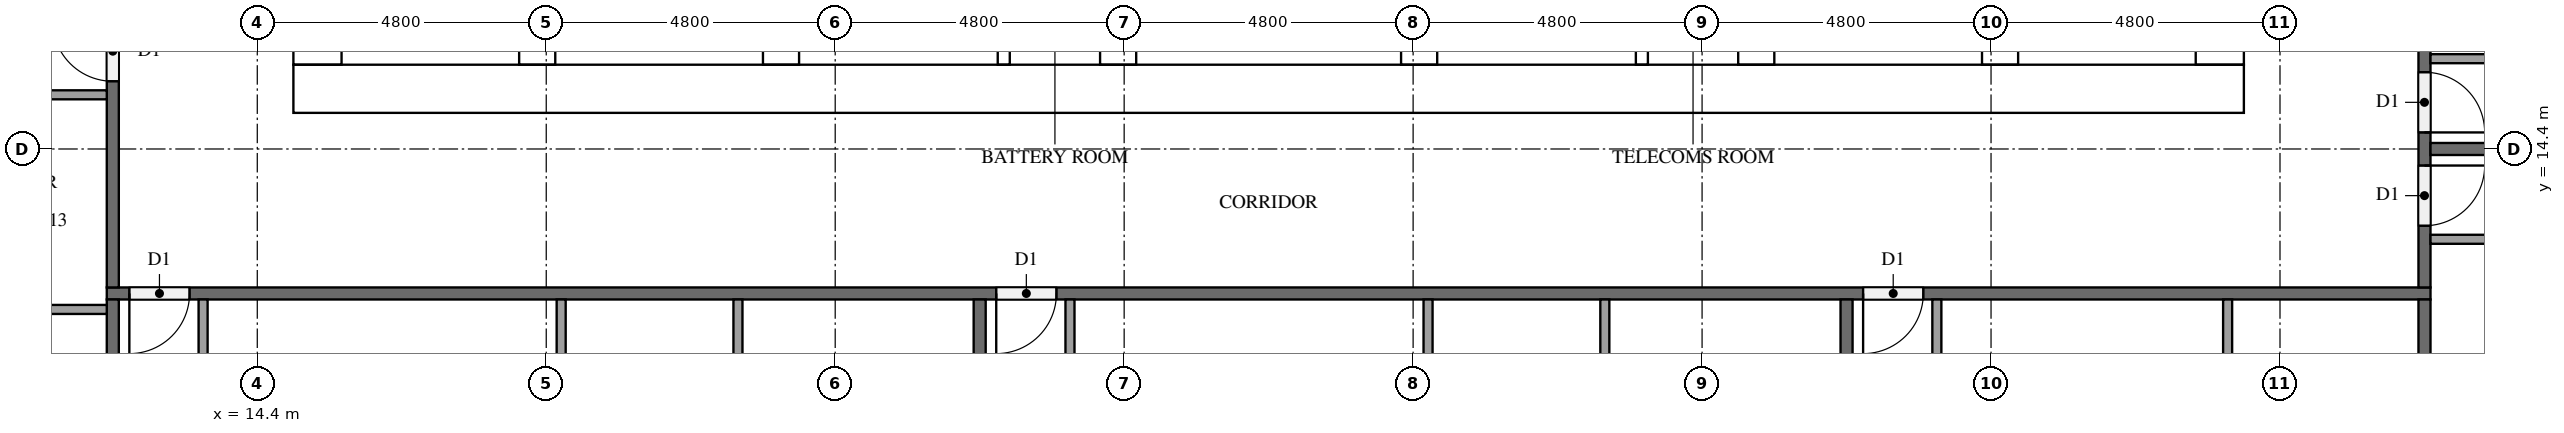
"""IFC4 building model, lengths in metres.
Left out: names, types, materials, properties, quantities, classifications, styles, units other than length and angle.
Written with IfcOpenShell. Run it as: python <this file> out.ifc"""

import sys

from ifc_helpers import new_model, si_unit, direction, frame, frame_2d, origin, place, context, subcontext, project, spatial, rectangle, extrude, element, fill, save


model = new_model("IFC4")
c1 = context("Model", 3, precision=1e-05, world=origin(), true_north=direction((0.0, 1.0)))
c2 = subcontext(c1, "Body", "Model", "MODEL_VIEW")
j1 = project(units=[si_unit("LENGTHUNIT", "METRE"), si_unit("PLANEANGLEUNIT", "RADIAN")], contexts=[c1])
p1 = place(None, origin())
s1 = spatial("IfcSite", under=j1, at=p1, CompositionType="ELEMENT")
p2 = place(p1, origin())
s2 = spatial("IfcBuilding", under=s1, at=p2, CompositionType="ELEMENT")
p3 = place(p2, frame((0.0, 0.0, 170.0)))
s3 = spatial("IfcBuildingStorey", under=s2, at=p3, CompositionType="ELEMENT", Elevation=170.0)
p4 = place(p3, frame((15.0, 15.4, 0.0), z_axis=(0.0, 0.0, 1.0), x_axis=(1.0, 0.0, 0.0)))
e1 = element("IfcWall", 1, at=p4, inside=s3, PredefinedType="SHEAR", context=c2, shape_type="SweptSolid", body=[
    extrude(rectangle(XDim=32.4, YDim=0.8, at=frame_2d((16.2, 0.0))), origin(), (0.0, 0.0, 1.0), 3.1),
])
p5 = place(p4, frame((15.3, 0.0, 0.0)))
e2 = element("IfcOpeningElement", 2, at=p5, cuts=e1, PredefinedType="OPENING", context=c2, shape_type="SweptSolid", body=[
    extrude(rectangle(XDim=1.8, YDim=2.1, at=frame_2d((0.9, 1.05))), frame((0.0, 0.41, 0.0), z_axis=(0.0, -1.0, 0.0), x_axis=(1.0, 0.0, 0.0)), (0.0, 0.0, 1.0), 0.82),
])
p6 = place(p3, frame((15.4, 15.8, 0.0), z_axis=(0.0, 0.0, 1.0), x_axis=(0.0, 1.0, 0.0)))
e3 = element("IfcWall", 3, at=p6, inside=s3, PredefinedType="SHEAR", context=c2, shape_type="SweptSolid", body=[
    extrude(rectangle(XDim=21.2, YDim=0.8, at=frame_2d((10.6, 0.0))), origin(), (0.0, 0.0, 1.0), 3.1),
])
p7 = place(p6, frame((4.96, 0.0, 0.0)))
e4 = element("IfcOpeningElement", 4, at=p7, cuts=e3, PredefinedType="OPENING", context=c2, shape_type="SweptSolid", body=[
    extrude(rectangle(XDim=1.2, YDim=2.1, at=frame_2d((0.6, 1.05))), frame((0.0, 0.41, 0.0), z_axis=(0.0, -1.0, 0.0), x_axis=(1.0, 0.0, 0.0)), (0.0, 0.0, 1.0), 0.82),
])
p8 = place(p3, frame((47.0, 15.8, 0.0), z_axis=(0.0, 0.0, 1.0), x_axis=(0.0, 1.0, 0.0)))
e5 = element("IfcWall", 5, at=p8, inside=s3, PredefinedType="SHEAR", context=c2, shape_type="SweptSolid", body=[
    extrude(rectangle(XDim=21.2, YDim=0.8, at=frame_2d((10.6, 0.0))), origin(), (0.0, 0.0, 1.0), 3.1),
])
p9 = place(p8, frame((10.3, 0.0, 0.0)))
e6 = element("IfcOpeningElement", 6, at=p9, cuts=e5, PredefinedType="OPENING", context=c2, shape_type="SweptSolid", body=[
    extrude(rectangle(XDim=1.2, YDim=2.1, at=frame_2d((0.6, 1.05))), frame((0.0, 0.41, 0.0), z_axis=(0.0, -1.0, 0.0), x_axis=(1.0, 0.0, 0.0)), (0.0, 0.0, 1.0), 0.82),
])
p10 = place(p3, frame((19.05, 15.8, 0.0), z_axis=(0.0, 0.0, 1.0), x_axis=(0.0, 1.0, 0.0)))
e7 = element("IfcWall", 7, at=p10, inside=s3, PredefinedType="SHEAR", context=c2, shape_type="SweptSolid", body=[
    extrude(rectangle(XDim=15.15, YDim=0.6, at=frame_2d((7.575, 0.0))), origin(), (0.0, 0.0, 1.0), 3.1),
])
p11 = place(p10, frame((9.65, 0.0, 0.0)))
e8 = element("IfcOpeningElement", 8, at=p11, cuts=e7, PredefinedType="OPENING", context=c2, shape_type="SweptSolid", body=[
    extrude(rectangle(XDim=1.1, YDim=2.1, at=frame_2d((0.55, 1.05))), frame((0.0, 0.31, 0.0), z_axis=(0.0, -1.0, 0.0), x_axis=(1.0, 0.0, 0.0)), (0.0, 0.0, 1.0), 0.62),
])
p12 = place(p10, frame((13.15, 0.0, 0.0)))
e9 = element("IfcOpeningElement", 9, at=p12, cuts=e7, PredefinedType="OPENING", context=c2, shape_type="SweptSolid", body=[
    extrude(rectangle(XDim=1.1, YDim=2.1, at=frame_2d((0.55, 1.05))), frame((0.0, 0.31, 0.0), z_axis=(0.0, -1.0, 0.0), x_axis=(1.0, 0.0, 0.0)), (0.0, 0.0, 1.0), 0.62),
])
p13 = place(p10, frame((0.4, 0.0, 0.0)))
e10 = element("IfcOpeningElement", 10, at=p13, cuts=e7, PredefinedType="OPENING", context=c2, shape_type="SweptSolid", body=[
    extrude(rectangle(XDim=1.2, YDim=2.1, at=frame_2d((0.6, 1.05))), frame((0.0, 0.31, 0.0), z_axis=(0.0, -1.0, 0.0), x_axis=(1.0, 0.0, 0.0)), (0.0, 0.0, 1.0), 0.62),
])
p14 = place(p3, frame((23.1, 15.8, 0.0), z_axis=(0.0, 0.0, 1.0), x_axis=(0.0, 1.0, 0.0)))
e11 = element("IfcWall", 11, at=p14, inside=s3, PredefinedType="SHEAR", context=c2, shape_type="SweptSolid", body=[
    extrude(rectangle(XDim=21.2, YDim=0.6, at=frame_2d((10.6, 0.0))), origin(), (0.0, 0.0, 1.0), 3.1),
])
p15 = place(p3, frame((39.3, 15.8, 0.0), z_axis=(0.0, 0.0, 1.0), x_axis=(0.0, 1.0, 0.0)))
e12 = element("IfcWall", 12, at=p15, inside=s3, PredefinedType="SHEAR", context=c2, shape_type="SweptSolid", body=[
    extrude(rectangle(XDim=8.45, YDim=0.6, at=frame_2d((4.225, 0.0))), origin(), (0.0, 0.0, 1.0), 3.1),
])
p16 = place(p3, frame((43.35, 15.8, 0.0), z_axis=(0.0, 0.0, 1.0), x_axis=(0.0, 1.0, 0.0)))
e13 = element("IfcWall", 13, at=p16, inside=s3, PredefinedType="SHEAR", context=c2, shape_type="SweptSolid", body=[
    extrude(rectangle(XDim=8.45, YDim=0.6, at=frame_2d((4.225, 0.0))), origin(), (0.0, 0.0, 1.0), 3.1),
])
p17 = place(p16, frame((0.4, 0.0, 0.0)))
e14 = element("IfcOpeningElement", 14, at=p17, cuts=e13, PredefinedType="OPENING", context=c2, shape_type="SweptSolid", body=[
    extrude(rectangle(XDim=1.2, YDim=2.1, at=frame_2d((0.6, 1.05))), frame((0.0, 0.31, 0.0), z_axis=(0.0, -1.0, 0.0), x_axis=(1.0, 0.0, 0.0)), (0.0, 0.0, 1.0), 0.62),
])
for number, where, z_axis, x_axis in (
    (15, (28.7, 15.8, 0.0), (0.0, 0.0, 1.0), (0.0, 1.0, 0.0)),
    (16, (33.7, 15.8, 0.0), (0.0, 0.0, 1.0), (0.0, 1.0, 0.0)),
):
    element("IfcWall", number, at=place(p3, frame(where, z_axis=z_axis, x_axis=x_axis)), inside=s3, PredefinedType="SHEAR", context=c2, shape_type="SweptSolid", body=[
        extrude(rectangle(XDim=2.65, YDim=0.6, at=frame_2d((1.325, 0.0))), origin(), (0.0, 0.0, 1.0), 3.1),
    ])
for number, where, z_axis, x_axis in (
    (17, (26.8, 15.8, 0.0), (0.0, 0.0, 1.0), (0.0, 1.0, 0.0)),
    (18, (37.4, 15.8, 0.0), (0.0, 0.0, 1.0), (0.0, 1.0, 0.0)),
):
    element("IfcWall", number, at=place(p3, frame(where, z_axis=z_axis, x_axis=x_axis)), inside=s3, PredefinedType="PARTITIONING", context=c2, shape_type="SweptSolid", body=[
        extrude(rectangle(XDim=2.65, YDim=0.2, at=frame_2d((1.325, 0.0))), origin(), (0.0, 0.0, 1.0), 3.1),
    ])
p18 = place(p3, frame((50.5, 12.0, 0.0), z_axis=(0.0, 0.0, 1.0), x_axis=(-1.0, 0.0, 0.0)))
e19 = element("IfcWall", 19, at=p18, inside=s3, PredefinedType="PARTITIONING", context=c2, shape_type="SweptSolid", body=[
    extrude(rectangle(XDim=38.6, YDim=0.2, at=frame_2d((19.3, 0.0))), origin(), (0.0, 0.0, 1.0), 3.1),
])
p19 = place(p18, frame((37.225, 0.0, 0.0)))
e20 = element("IfcOpeningElement", 20, at=p19, cuts=e19, PredefinedType="OPENING", context=c2, shape_type="SweptSolid", body=[
    extrude(rectangle(XDim=1.0, YDim=2.1, at=frame_2d((0.5, 1.05))), frame((0.0, 0.11, 0.0), z_axis=(0.0, -1.0, 0.0), x_axis=(1.0, 0.0, 0.0)), (0.0, 0.0, 1.0), 0.22),
])
p20 = place(p18, frame((22.825, 0.0, 0.0)))
e21 = element("IfcOpeningElement", 21, at=p20, cuts=e19, PredefinedType="OPENING", context=c2, shape_type="SweptSolid", body=[
    extrude(rectangle(XDim=1.0, YDim=2.1, at=frame_2d((0.5, 1.05))), frame((0.0, 0.11, 0.0), z_axis=(0.0, -1.0, 0.0), x_axis=(1.0, 0.0, 0.0)), (0.0, 0.0, 1.0), 0.22),
])
p21 = place(p18, frame((8.425, 0.0, 0.0)))
e22 = element("IfcOpeningElement", 22, at=p21, cuts=e19, PredefinedType="OPENING", context=c2, shape_type="SweptSolid", body=[
    extrude(rectangle(XDim=1.0, YDim=2.1, at=frame_2d((0.5, 1.05))), frame((0.0, 0.11, 0.0), z_axis=(0.0, -1.0, 0.0), x_axis=(1.0, 0.0, 0.0)), (0.0, 0.0, 1.0), 0.22),
])
p22 = place(p3, frame((50.4, 40.7, 0.0), z_axis=(0.0, 0.0, 1.0), x_axis=(0.0, -1.0, 0.0)))
e23 = element("IfcWall", 23, at=p22, inside=s3, PredefinedType="PARTITIONING", context=c2, shape_type="SweptSolid", body=[
    extrude(rectangle(XDim=28.6, YDim=0.2, at=frame_2d((14.3, 0.0))), origin(), (0.0, 0.0, 1.0), 3.1),
])
p23 = place(p22, frame((26.575, 0.0, 0.0)))
e24 = element("IfcOpeningElement", 24, at=p23, cuts=e23, PredefinedType="OPENING", context=c2, shape_type="SweptSolid", body=[
    extrude(rectangle(XDim=1.0, YDim=2.1, at=frame_2d((0.5, 1.05))), frame((0.0, 0.11, 0.0), z_axis=(0.0, -1.0, 0.0), x_axis=(1.0, 0.0, 0.0)), (0.0, 0.0, 1.0), 0.22),
])
p24 = place(p22, frame((25.025, 0.0, 0.0)))
e25 = element("IfcOpeningElement", 25, at=p24, cuts=e23, PredefinedType="OPENING", context=c2, shape_type="SweptSolid", body=[
    extrude(rectangle(XDim=1.0, YDim=2.1, at=frame_2d((0.5, 1.05))), frame((0.0, 0.11, 0.0), z_axis=(0.0, -1.0, 0.0), x_axis=(1.0, 0.0, 0.0)), (0.0, 0.0, 1.0), 0.22),
])
p25 = place(p22, frame((4.975, 0.0, 0.0)))
e26 = element("IfcOpeningElement", 26, at=p25, cuts=e23, PredefinedType="OPENING", context=c2, shape_type="SweptSolid", body=[
    extrude(rectangle(XDim=1.0, YDim=2.1, at=frame_2d((0.5, 1.05))), frame((0.0, 0.11, 0.0), z_axis=(0.0, -1.0, 0.0), x_axis=(1.0, 0.0, 0.0)), (0.0, 0.0, 1.0), 0.22),
])
p26 = place(p22, frame((3.425, 0.0, 0.0)))
e27 = element("IfcOpeningElement", 27, at=p26, cuts=e23, PredefinedType="OPENING", context=c2, shape_type="SweptSolid", body=[
    extrude(rectangle(XDim=1.0, YDim=2.1, at=frame_2d((0.5, 1.05))), frame((0.0, 0.11, 0.0), z_axis=(0.0, -1.0, 0.0), x_axis=(1.0, 0.0, 0.0)), (0.0, 0.0, 1.0), 0.22),
])
p27 = place(p3, frame((12.0, 12.1, 0.0), z_axis=(0.0, 0.0, 1.0), x_axis=(0.0, 1.0, 0.0)))
e28 = element("IfcWall", 28, at=p27, inside=s3, PredefinedType="PARTITIONING", context=c2, shape_type="SweptSolid", body=[
    extrude(rectangle(XDim=28.6, YDim=0.2, at=frame_2d((14.3, 0.0))), origin(), (0.0, 0.0, 1.0), 3.1),
])
p28 = place(p27, frame((19.375, 0.0, 0.0)))
e29 = element("IfcOpeningElement", 29, at=p28, cuts=e28, PredefinedType="OPENING", context=c2, shape_type="SweptSolid", body=[
    extrude(rectangle(XDim=1.0, YDim=2.1, at=frame_2d((0.5, 1.05))), frame((0.0, 0.11, 0.0), z_axis=(0.0, -1.0, 0.0), x_axis=(1.0, 0.0, 0.0)), (0.0, 0.0, 1.0), 0.22),
])
p29 = place(p27, frame((4.975, 0.0, 0.0)))
e30 = element("IfcOpeningElement", 30, at=p29, cuts=e28, PredefinedType="OPENING", context=c2, shape_type="SweptSolid", body=[
    extrude(rectangle(XDim=1.0, YDim=2.1, at=frame_2d((0.5, 1.05))), frame((0.0, 0.11, 0.0), z_axis=(0.0, -1.0, 0.0), x_axis=(1.0, 0.0, 0.0)), (0.0, 0.0, 1.0), 0.22),
])
p30 = place(p27, frame((3.425, 0.0, 0.0)))
e31 = element("IfcOpeningElement", 31, at=p30, cuts=e28, PredefinedType="OPENING", context=c2, shape_type="SweptSolid", body=[
    extrude(rectangle(XDim=1.0, YDim=2.1, at=frame_2d((0.5, 1.05))), frame((0.0, 0.11, 0.0), z_axis=(0.0, -1.0, 0.0), x_axis=(1.0, 0.0, 0.0)), (0.0, 0.0, 1.0), 0.22),
])
for number, where, z_axis, x_axis in (
    (32, (26.4, 11.9, 0.0), (0.0, 0.0, 1.0), (0.0, -1.0, 0.0)),
    (33, (12.0, 0.1, 0.0), (0.0, 0.0, 1.0), (0.0, 1.0, 0.0)),
    (34, (40.8, 11.9, 0.0), (0.0, 0.0, 1.0), (0.0, -1.0, 0.0)),
    (35, (50.4, 11.9, 0.0), (0.0, 0.0, 1.0), (0.0, -1.0, 0.0)),
):
    element("IfcWall", number, at=place(p3, frame(where, z_axis=z_axis, x_axis=x_axis)), inside=s3, PredefinedType="PARTITIONING", context=c2, shape_type="SweptSolid", body=[
        extrude(rectangle(XDim=11.8, YDim=0.2, at=frame_2d((5.9, 0.0))), origin(), (0.0, 0.0, 1.0), 3.1),
    ])
p31 = place(p3, frame((50.5, 14.4, 0.0), z_axis=(0.0, 0.0, 1.0), x_axis=(1.0, 0.0, 0.0)))
e36 = element("IfcWall", 36, at=p31, inside=s3, PredefinedType="PARTITIONING", context=c2, shape_type="SweptSolid", body=[
    extrude(rectangle(XDim=6.725, YDim=0.2, at=frame_2d((3.363, 0.0))), origin(), (0.0, 0.0, 1.0), 3.1),
])
for number, where, z_axis, x_axis in (
    (37, (19.448, 11.9, 0.0), (0.0, 0.0, 1.0), (0.0, -1.0, 0.0)),
    (38, (22.385, 11.9, 0.0), (0.0, 0.0, 1.0), (0.0, -1.0, 0.0)),
):
    element("IfcWall", number, at=place(p3, frame(where, z_axis=z_axis, x_axis=x_axis)), inside=s3, PredefinedType="PARTITIONING", context=c2, shape_type="SweptSolid", body=[
        extrude(rectangle(XDim=2.975, YDim=0.15, at=frame_2d((1.487, 0.0))), origin(), (0.0, 0.0, 1.0), 3.1),
    ])
p32 = place(p3, frame((13.5, 11.9, 0.0), z_axis=(0.0, 0.0, 1.0), x_axis=(0.0, -1.0, 0.0)))
e39 = element("IfcWall", 39, at=p32, inside=s3, PredefinedType="PARTITIONING", context=c2, shape_type="SweptSolid", body=[
    extrude(rectangle(XDim=3.125, YDim=0.15, at=frame_2d((1.562, 0.0))), origin(), (0.0, 0.0, 1.0), 3.1),
])
for number, where, z_axis, x_axis in (
    (40, (33.848, 11.9, 0.0), (0.0, 0.0, 1.0), (0.0, -1.0, 0.0)),
    (41, (36.785, 11.9, 0.0), (0.0, 0.0, 1.0), (0.0, -1.0, 0.0)),
):
    element("IfcWall", number, at=place(p3, frame(where, z_axis=z_axis, x_axis=x_axis)), inside=s3, PredefinedType="PARTITIONING", context=c2, shape_type="SweptSolid", body=[
        extrude(rectangle(XDim=3.725, YDim=0.15, at=frame_2d((1.862, 0.0))), origin(), (0.0, 0.0, 1.0), 3.1),
    ])
p33 = place(p3, frame((27.9, 11.9, 0.0), z_axis=(0.0, 0.0, 1.0), x_axis=(0.0, -1.0, 0.0)))
e42 = element("IfcWall", 42, at=p33, inside=s3, PredefinedType="PARTITIONING", context=c2, shape_type="SweptSolid", body=[
    extrude(rectangle(XDim=3.875, YDim=0.15, at=frame_2d((1.938, 0.0))), origin(), (0.0, 0.0, 1.0), 3.1),
])
p34 = place(p3, frame((47.13, 11.9, 0.0), z_axis=(0.0, 0.0, 1.0), x_axis=(0.0, -1.0, 0.0)))
e43 = element("IfcWall", 43, at=p34, inside=s3, PredefinedType="PARTITIONING", context=c2, shape_type="SweptSolid", body=[
    extrude(rectangle(XDim=4.475, YDim=0.15, at=frame_2d((2.237, 0.0))), origin(), (0.0, 0.0, 1.0), 3.1),
])
p35 = place(p3, frame((42.3, 11.9, 0.0), z_axis=(0.0, 0.0, 1.0), x_axis=(0.0, -1.0, 0.0)))
e44 = element("IfcWall", 44, at=p35, inside=s3, PredefinedType="PARTITIONING", context=c2, shape_type="SweptSolid", body=[
    extrude(rectangle(XDim=4.625, YDim=0.15, at=frame_2d((2.312, 0.0))), origin(), (0.0, 0.0, 1.0), 3.1),
])
p36 = place(p3, frame((50.5, 12.9, 0.0), z_axis=(0.0, 0.0, 1.0), x_axis=(1.0, 0.0, 0.0)))
e45 = element("IfcWall", 45, at=p36, inside=s3, PredefinedType="PARTITIONING", context=c2, shape_type="SweptSolid", body=[
    extrude(rectangle(XDim=1.925, YDim=0.15, at=frame_2d((0.962, 0.0))), origin(), (0.0, 0.0, 1.0), 3.1),
])
p37 = place(p3, frame((50.5, 15.9, 0.0), z_axis=(0.0, 0.0, 1.0), x_axis=(1.0, 0.0, 0.0)))
e46 = element("IfcWall", 46, at=p37, inside=s3, PredefinedType="PARTITIONING", context=c2, shape_type="SweptSolid", body=[
    extrude(rectangle(XDim=2.375, YDim=0.15, at=frame_2d((1.188, 0.0))), origin(), (0.0, 0.0, 1.0), 3.1),
])
p38 = place(p3, frame((11.9, 11.735, 0.0), z_axis=(0.0, 0.0, 1.0), x_axis=(-1.0, 0.0, 0.0)))
e47 = element("IfcWall", 47, at=p38, inside=s3, PredefinedType="PARTITIONING", context=c2, shape_type="SweptSolid", body=[
    extrude(rectangle(XDim=2.975, YDim=0.15, at=frame_2d((1.487, 0.0))), origin(), (0.0, 0.0, 1.0), 3.1),
])
p39 = place(p3, frame((11.9, 15.3, 0.0), z_axis=(0.0, 0.0, 1.0), x_axis=(-1.0, 0.0, 0.0)))
e48 = element("IfcWall", 48, at=p39, inside=s3, PredefinedType="PARTITIONING", context=c2, shape_type="SweptSolid", body=[
    extrude(rectangle(XDim=3.125, YDim=0.15, at=frame_2d((1.562, 0.0))), origin(), (0.0, 0.0, 1.0), 3.1),
])
p40 = place(p5, frame((1.8, 0.0, 0.0), z_axis=(0.0, 0.0, 1.0), x_axis=(-1.0, 0.0, 0.0)))
e49 = element("IfcDoor", 49, at=p40, inside=s3, OperationType="DOUBLE_DOOR_SINGLE_SWING", PredefinedType="DOOR", context=c2, shape_type="SweptSolid", body=[
    extrude(rectangle(XDim=1.8, YDim=2.1, at=frame_2d((0.9, 1.05))), frame((0.0, 0.025, 0.0), z_axis=(0.0, -1.0, 0.0), x_axis=(1.0, 0.0, 0.0)), (0.0, 0.0, 1.0), 0.05),
])
fill(e2, e49)
p41 = place(p19, origin())
e50 = element("IfcDoor", 50, at=p41, inside=s3, OperationType="SINGLE_SWING_RIGHT", PredefinedType="DOOR", context=c2, shape_type="SweptSolid", body=[
    extrude(rectangle(XDim=1.0, YDim=2.1, at=frame_2d((0.5, 1.05))), frame((0.0, 0.025, 0.0), z_axis=(0.0, -1.0, 0.0), x_axis=(1.0, 0.0, 0.0)), (0.0, 0.0, 1.0), 0.05),
])
fill(e20, e50)
p42 = place(p20, origin())
e51 = element("IfcDoor", 51, at=p42, inside=s3, OperationType="SINGLE_SWING_RIGHT", PredefinedType="DOOR", context=c2, shape_type="SweptSolid", body=[
    extrude(rectangle(XDim=1.0, YDim=2.1, at=frame_2d((0.5, 1.05))), frame((0.0, 0.025, 0.0), z_axis=(0.0, -1.0, 0.0), x_axis=(1.0, 0.0, 0.0)), (0.0, 0.0, 1.0), 0.05),
])
fill(e21, e51)
p43 = place(p21, origin())
e52 = element("IfcDoor", 52, at=p43, inside=s3, OperationType="SINGLE_SWING_RIGHT", PredefinedType="DOOR", context=c2, shape_type="SweptSolid", body=[
    extrude(rectangle(XDim=1.0, YDim=2.1, at=frame_2d((0.5, 1.05))), frame((0.0, 0.025, 0.0), z_axis=(0.0, -1.0, 0.0), x_axis=(1.0, 0.0, 0.0)), (0.0, 0.0, 1.0), 0.05),
])
fill(e22, e52)
p44 = place(p23, origin())
e53 = element("IfcDoor", 53, at=p44, inside=s3, OperationType="SINGLE_SWING_LEFT", PredefinedType="DOOR", context=c2, shape_type="SweptSolid", body=[
    extrude(rectangle(XDim=1.0, YDim=2.1, at=frame_2d((0.5, 1.05))), frame((0.0, 0.025, 0.0), z_axis=(0.0, -1.0, 0.0), x_axis=(1.0, 0.0, 0.0)), (0.0, 0.0, 1.0), 0.05),
])
fill(e24, e53)
p45 = place(p24, origin())
e54 = element("IfcDoor", 54, at=p45, inside=s3, OperationType="SINGLE_SWING_RIGHT", PredefinedType="DOOR", context=c2, shape_type="SweptSolid", body=[
    extrude(rectangle(XDim=1.0, YDim=2.1, at=frame_2d((0.5, 1.05))), frame((0.0, 0.025, 0.0), z_axis=(0.0, -1.0, 0.0), x_axis=(1.0, 0.0, 0.0)), (0.0, 0.0, 1.0), 0.05),
])
fill(e25, e54)
p46 = place(p30, origin())
e55 = element("IfcDoor", 55, at=p46, inside=s3, OperationType="SINGLE_SWING_RIGHT", PredefinedType="DOOR", context=c2, shape_type="SweptSolid", body=[
    extrude(rectangle(XDim=1.0, YDim=2.1, at=frame_2d((0.5, 1.05))), frame((0.0, 0.025, 0.0), z_axis=(0.0, -1.0, 0.0), x_axis=(1.0, 0.0, 0.0)), (0.0, 0.0, 1.0), 0.05),
])
fill(e31, e55)
save(model, sys.argv[1])
